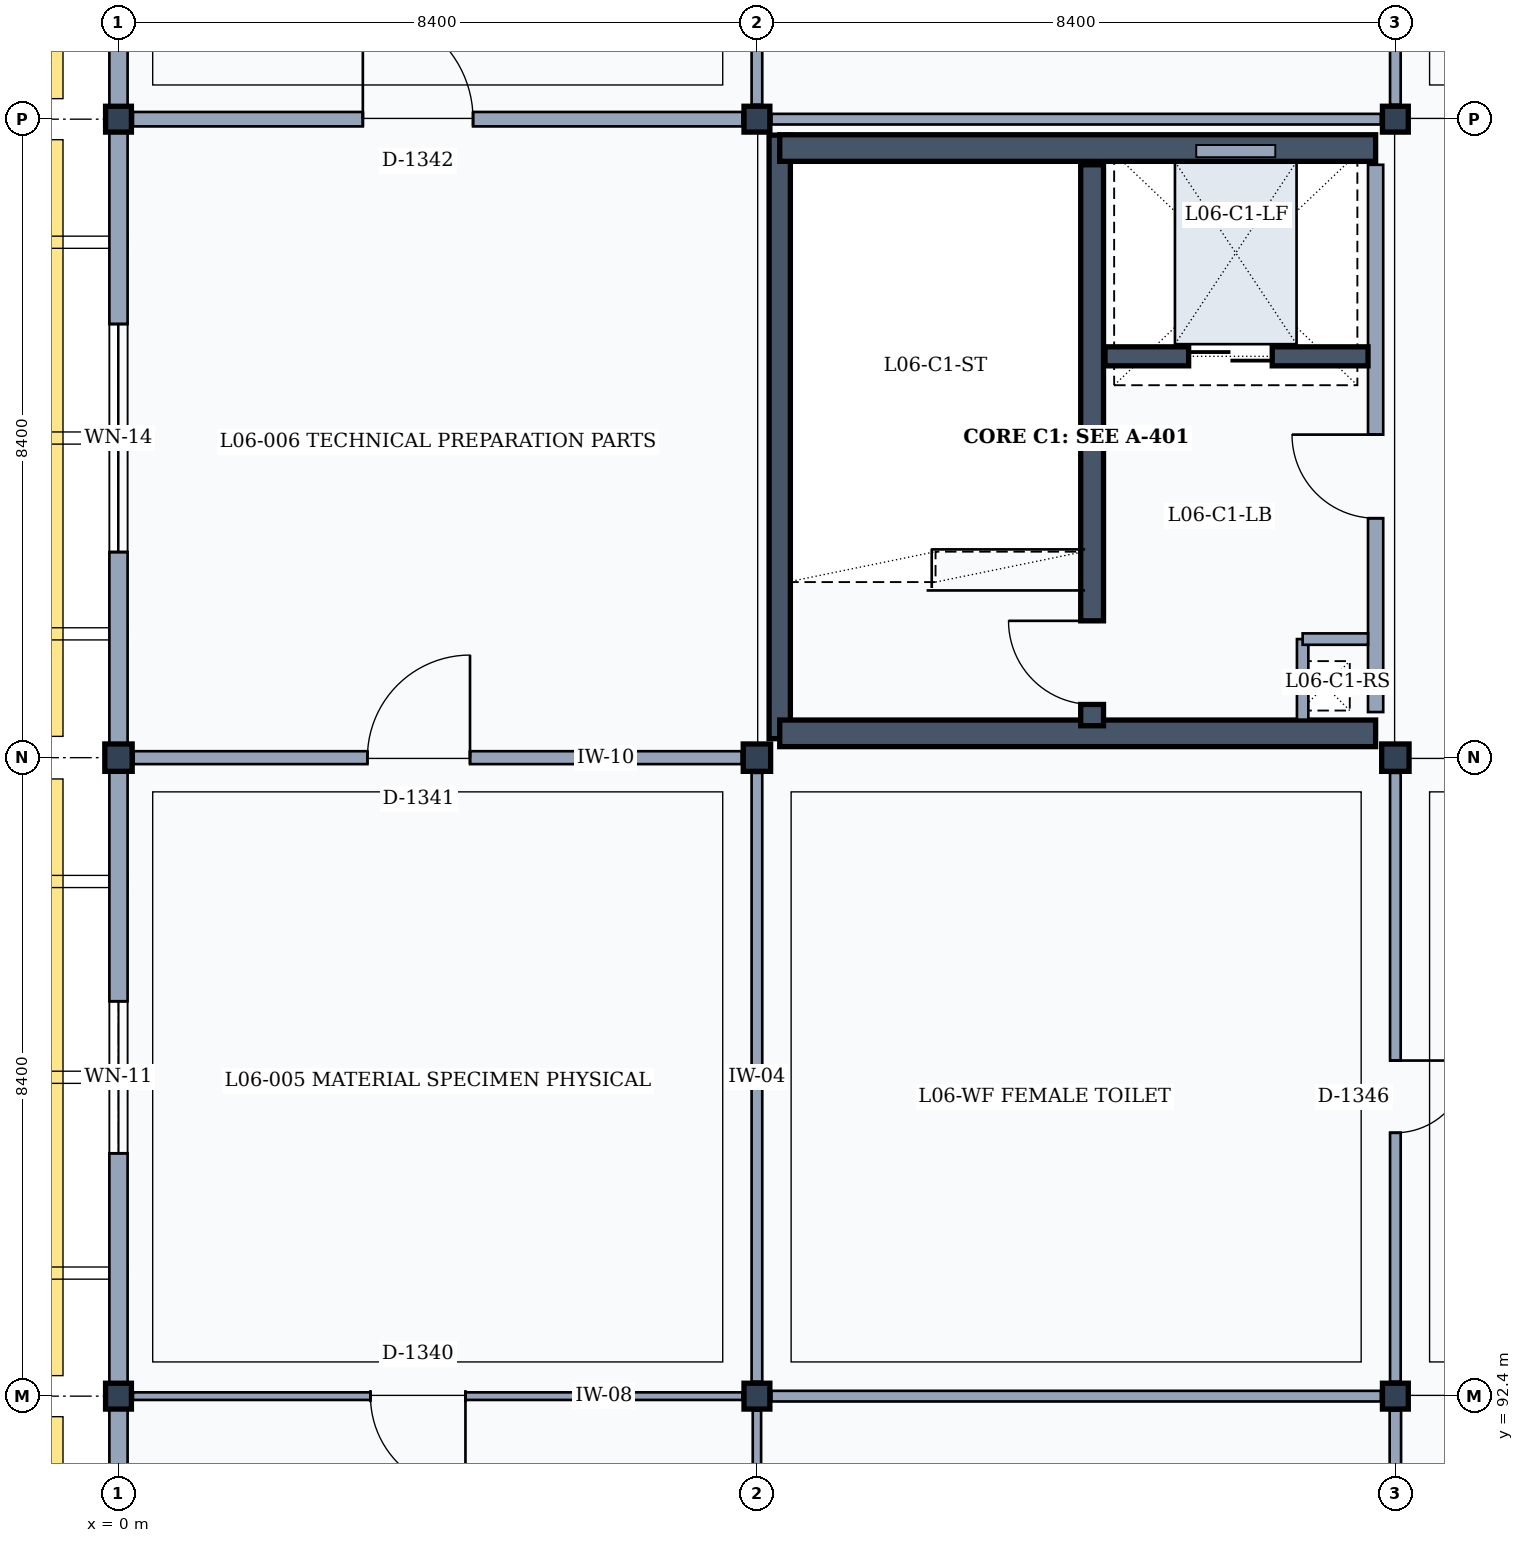
"""IFC4 building model, lengths in metres.
Left out: names, types, materials, properties, quantities, classifications, styles, units other than length and angle.
Written with IfcOpenShell. Run it as: python <this file> out.ifc"""

import sys

from ifc_helpers import new_model, si_unit, direction, frame, frame_2d, origin, origin_2d, place, context, subcontext, project, spatial, rectangle, extrude, element, fill, save


model = new_model("IFC4")
c1 = context("Model", 3, precision=1e-05, world=origin(), true_north=direction((0.0, 1.0)))
c2 = subcontext(c1, "Body", "Model", "MODEL_VIEW")
j1 = project(units=[si_unit("LENGTHUNIT", "METRE"), si_unit("PLANEANGLEUNIT", "RADIAN")], contexts=[c1])
p1 = place(None, origin())
s1 = spatial("IfcSite", under=j1, at=p1, CompositionType="ELEMENT")
p2 = place(p1, origin())
s2 = spatial("IfcBuilding", under=s1, at=p2, CompositionType="ELEMENT")
p3 = place(p2, frame((0.0, 0.0, 26.4)))
s3 = spatial("IfcBuildingStorey", under=s2, at=p3, CompositionType="ELEMENT", Elevation=26.4)
p4 = place(p3, frame((0.0, 92.4, 0.0), z_axis=(0.0, 0.0, 1.0), x_axis=(1.0, 0.0, 0.0)))
e1 = element("IfcColumn", 1, at=p4, inside=s3, PredefinedType="COLUMN", context=c2, shape_type="SweptSolid", body=[
    extrude(rectangle(XDim=0.34, YDim=0.34, at=origin_2d()), origin(), (0.0, 0.0, 1.0), 4.2),
])
p5 = place(p3, frame((0.0, 100.8, 0.0), z_axis=(0.0, 0.0, 1.0), x_axis=(1.0, 0.0, 0.0)))
e2 = element("IfcColumn", 2, at=p5, inside=s3, PredefinedType="COLUMN", context=c2, shape_type="SweptSolid", body=[
    extrude(rectangle(XDim=0.36, YDim=0.36, at=origin_2d()), origin(), (0.0, 0.0, 1.0), 4.2),
])
for number, where, z_axis, x_axis in (
    (3, (0.0, 109.2, 0.0), (0.0, 0.0, 1.0), (1.0, 0.0, 0.0)),
    (4, (8.4, 92.4, 0.0), (0.0, 0.0, 1.0), (1.0, 0.0, 0.0)),
):
    element("IfcColumn", number, at=place(p3, frame(where, z_axis=z_axis, x_axis=x_axis)), inside=s3, PredefinedType="COLUMN", context=c2, shape_type="SweptSolid", body=[
        extrude(rectangle(XDim=0.34, YDim=0.34, at=origin_2d()), origin(), (0.0, 0.0, 1.0), 4.2),
    ])
p6 = place(p3, frame((8.4, 100.8, 0.0), z_axis=(0.0, 0.0, 1.0), x_axis=(1.0, 0.0, 0.0)))
e5 = element("IfcColumn", 5, at=p6, inside=s3, PredefinedType="COLUMN", context=c2, shape_type="SweptSolid", body=[
    extrude(rectangle(XDim=0.36, YDim=0.36, at=origin_2d()), origin(), (0.0, 0.0, 1.0), 4.2),
])
for number, where, z_axis, x_axis in (
    (6, (8.4, 109.2, 0.0), (0.0, 0.0, 1.0), (1.0, 0.0, 0.0)),
    (7, (16.8, 92.4, 0.0), (0.0, 0.0, 1.0), (1.0, 0.0, 0.0)),
):
    element("IfcColumn", number, at=place(p3, frame(where, z_axis=z_axis, x_axis=x_axis)), inside=s3, PredefinedType="COLUMN", context=c2, shape_type="SweptSolid", body=[
        extrude(rectangle(XDim=0.34, YDim=0.34, at=origin_2d()), origin(), (0.0, 0.0, 1.0), 4.2),
    ])
p7 = place(p3, frame((16.8, 100.8, 0.0), z_axis=(0.0, 0.0, 1.0), x_axis=(1.0, 0.0, 0.0)))
e8 = element("IfcColumn", 8, at=p7, inside=s3, PredefinedType="COLUMN", context=c2, shape_type="SweptSolid", body=[
    extrude(rectangle(XDim=0.36, YDim=0.36, at=origin_2d()), origin(), (0.0, 0.0, 1.0), 4.2),
])
p8 = place(p3, frame((16.8, 109.2, 0.0), z_axis=(0.0, 0.0, 1.0), x_axis=(1.0, 0.0, 0.0)))
e9 = element("IfcColumn", 9, at=p8, inside=s3, PredefinedType="COLUMN", context=c2, shape_type="SweptSolid", body=[
    extrude(rectangle(XDim=0.34, YDim=0.34, at=origin_2d()), origin(), (0.0, 0.0, 1.0), 4.2),
])
p9 = place(p3, frame((0.0, 84.18, 0.0), z_axis=(0.0, 0.0, 1.0), x_axis=(0.0, 1.0, 0.0)))
e10 = element("IfcWall", 10, at=p9, inside=s3, PredefinedType="SOLIDWALL", context=c2, shape_type="SweptSolid", body=[
    extrude(rectangle(XDim=8.05, YDim=0.24, at=frame_2d((4.025, 0.0))), origin(), (0.0, 0.0, 1.0), 3.36),
])
p10 = place(p9, frame((3.225, 0.0, 0.9)))
e11 = element("IfcOpeningElement", 11, at=p10, cuts=e10, PredefinedType="OPENING", context=c2, shape_type="SweptSolid", body=[
    extrude(rectangle(XDim=1.6, YDim=2.0, at=frame_2d((0.8, 1.0))), frame((0.0, 0.13, 0.0), z_axis=(0.0, -1.0, 0.0), x_axis=(1.0, 0.0, 0.0)), (0.0, 0.0, 1.0), 0.26),
])
p11 = place(p3, frame((0.0, 92.57, 0.0), z_axis=(0.0, 0.0, 1.0), x_axis=(0.0, 1.0, 0.0)))
e12 = element("IfcWall", 12, at=p11, inside=s3, PredefinedType="SOLIDWALL", context=c2, shape_type="SweptSolid", body=[
    extrude(rectangle(XDim=8.05, YDim=0.24, at=frame_2d((4.025, 0.0))), origin(), (0.0, 0.0, 1.0), 3.36),
])
p12 = place(p11, frame((3.025, 0.0, 0.9)))
e13 = element("IfcOpeningElement", 13, at=p12, cuts=e12, PredefinedType="OPENING", context=c2, shape_type="SweptSolid", body=[
    extrude(rectangle(XDim=2.0, YDim=1.7, at=frame_2d((1.0, 0.85))), frame((0.0, 0.13, 0.0), z_axis=(0.0, -1.0, 0.0), x_axis=(1.0, 0.0, 0.0)), (0.0, 0.0, 1.0), 0.26),
])
p13 = place(p3, frame((0.0, 100.98, 0.0), z_axis=(0.0, 0.0, 1.0), x_axis=(0.0, 1.0, 0.0)))
e14 = element("IfcWall", 14, at=p13, inside=s3, PredefinedType="SOLIDWALL", context=c2, shape_type="SweptSolid", body=[
    extrude(rectangle(XDim=8.05, YDim=0.24, at=frame_2d((4.025, 0.0))), origin(), (0.0, 0.0, 1.0), 3.36),
])
p14 = place(p13, frame((2.525, 0.0, 0.9)))
e15 = element("IfcOpeningElement", 15, at=p14, cuts=e14, PredefinedType="OPENING", context=c2, shape_type="SweptSolid", body=[
    extrude(rectangle(XDim=3.0, YDim=1.8, at=frame_2d((1.5, 0.9))), frame((0.0, 0.13, 0.0), z_axis=(0.0, -1.0, 0.0), x_axis=(1.0, 0.0, 0.0)), (0.0, 0.0, 1.0), 0.26),
])
p15 = place(p3, frame((0.0, 109.37, 0.0), z_axis=(0.0, 0.0, 1.0), x_axis=(0.0, 1.0, 0.0)))
e16 = element("IfcWall", 16, at=p15, inside=s3, PredefinedType="SOLIDWALL", context=c2, shape_type="SweptSolid", body=[
    extrude(rectangle(XDim=8.05, YDim=0.24, at=frame_2d((4.025, 0.0))), origin(), (0.0, 0.0, 1.0), 3.36),
])
p16 = place(p15, frame((2.775, 0.0, 0.9)))
e17 = element("IfcOpeningElement", 17, at=p16, cuts=e16, PredefinedType="OPENING", context=c2, shape_type="SweptSolid", body=[
    extrude(rectangle(XDim=2.5, YDim=2.0, at=frame_2d((1.25, 1.0))), frame((0.0, 0.13, 0.0), z_axis=(0.0, -1.0, 0.0), x_axis=(1.0, 0.0, 0.0)), (0.0, 0.0, 1.0), 0.26),
])
p17 = place(p3, frame((8.7, 101.05, 0.0), z_axis=(0.0, 0.0, 1.0), x_axis=(0.0, 1.0, 0.0)))
e18 = element("IfcWall", 18, at=p17, inside=s3, PredefinedType="SHEAR", context=c2, shape_type="SweptSolid", body=[
    extrude(rectangle(XDim=7.94, YDim=0.28, at=frame_2d((3.97, 0.0))), origin(), (0.0, 0.0, 1.0), 3.99),
])
p18 = place(p3, frame((8.7, 108.82, 0.0), z_axis=(0.0, 0.0, 1.0), x_axis=(1.0, 0.0, 0.0)))
e19 = element("IfcWall", 19, at=p18, inside=s3, PredefinedType="SHEAR", context=c2, shape_type="SweptSolid", body=[
    extrude(rectangle(XDim=7.84, YDim=0.35, at=frame_2d((3.92, 0.0))), origin(), (0.0, 0.0, 1.0), 3.99),
])
p19 = place(p3, frame((16.54, 108.6, 0.0), z_axis=(0.0, 0.0, 1.0), x_axis=(0.0, -1.0, 0.0)))
e20 = element("IfcWall", 20, at=p19, inside=s3, PredefinedType="PARTITIONING", context=c2, shape_type="SweptSolid", body=[
    extrude(rectangle(XDim=7.2, YDim=0.2, at=frame_2d((3.6, 0.0))), origin(), (0.0, 0.0, 1.0), 3.32),
])
p20 = place(p19, frame((3.55, 0.0, 0.0)))
e21 = element("IfcOpeningElement", 21, at=p20, cuts=e20, PredefinedType="OPENING", context=c2, shape_type="SweptSolid", body=[
    extrude(rectangle(XDim=1.1, YDim=2.15, at=frame_2d((0.55, 1.075))), frame((0.0, 0.11, 0.0), z_axis=(0.0, -1.0, 0.0), x_axis=(1.0, 0.0, 0.0)), (0.0, 0.0, 1.0), 0.22),
])
p21 = place(p3, frame((16.54, 101.12, 0.0), z_axis=(0.0, 0.0, 1.0), x_axis=(-1.0, 0.0, 0.0)))
e22 = element("IfcWall", 22, at=p21, inside=s3, PredefinedType="SHEAR", context=c2, shape_type="SweptSolid", body=[
    extrude(rectangle(XDim=7.84, YDim=0.35, at=frame_2d((3.92, 0.0))), origin(), (0.0, 0.0, 1.0), 3.99),
])
p22 = place(p3, frame((12.81, 101.22, 0.0), z_axis=(0.0, 0.0, 1.0), x_axis=(0.0, 1.0, 0.0)))
e23 = element("IfcWall", 23, at=p22, inside=s3, PredefinedType="SHEAR", context=c2, shape_type="SweptSolid", body=[
    extrude(rectangle(XDim=7.38, YDim=0.3, at=frame_2d((3.69, 0.0))), origin(), (0.0, 0.0, 1.0), 3.99),
])
p23 = place(p22, frame((0.28, 0.0, 0.0)))
e24 = element("IfcOpeningElement", 24, at=p23, cuts=e23, PredefinedType="OPENING", context=c2, shape_type="SweptSolid", body=[
    extrude(rectangle(XDim=1.1, YDim=2.15, at=frame_2d((0.55, 1.075))), frame((0.0, 0.16, 0.0), z_axis=(0.0, -1.0, 0.0), x_axis=(1.0, 0.0, 0.0)), (0.0, 0.0, 1.0), 0.32),
])
p24 = place(p3, frame((15.58, 102.36, 0.0), z_axis=(0.0, 0.0, 1.0), x_axis=(0.0, -1.0, 0.0)))
e25 = element("IfcWall", 25, at=p24, inside=s3, PredefinedType="PARTITIONING", context=c2, shape_type="SweptSolid", body=[
    extrude(rectangle(XDim=1.06, YDim=0.15, at=frame_2d((0.53, 0.0))), origin(), (0.0, 0.0, 1.0), 3.32),
])
p25 = place(p3, frame((15.58, 102.36, 0.0), z_axis=(0.0, 0.0, 1.0), x_axis=(1.0, 0.0, 0.0)))
e26 = element("IfcWall", 26, at=p25, inside=s3, PredefinedType="PARTITIONING", context=c2, shape_type="SweptSolid", body=[
    extrude(rectangle(XDim=0.86, YDim=0.15, at=frame_2d((0.43, 0.0))), origin(), (0.0, 0.0, 1.0), 3.32),
])
p26 = place(p3, frame((12.98, 106.08, 0.0), z_axis=(0.0, 0.0, 1.0), x_axis=(1.0, 0.0, 0.0)))
e27 = element("IfcWall", 27, at=p26, inside=s3, PredefinedType="SHEAR", context=c2, shape_type="SweptSolid", body=[
    extrude(rectangle(XDim=3.46, YDim=0.25, at=frame_2d((1.73, 0.0))), origin(), (0.0, 0.0, 1.0), 3.99),
])
p27 = place(p26, frame((1.1, 0.0, 0.0)))
e28 = element("IfcOpeningElement", 28, at=p27, cuts=e27, PredefinedType="OPENING", context=c2, shape_type="SweptSolid", body=[
    extrude(rectangle(XDim=1.1, YDim=2.15, at=frame_2d((0.55, 1.075))), frame((0.0, 0.135, 0.0), z_axis=(0.0, -1.0, 0.0), x_axis=(1.0, 0.0, 0.0)), (0.0, 0.0, 1.0), 0.27),
])
p28 = place(p3, frame((8.4, 84.2, 0.0), z_axis=(0.0, 0.0, 1.0), x_axis=(0.0, 1.0, 0.0)))
e29 = element("IfcWall", 29, at=p28, inside=s3, PredefinedType="PARTITIONING", context=c2, shape_type="SweptSolid", body=[
    extrude(rectangle(XDim=8.01, YDim=0.11, at=frame_2d((4.005, 0.0))), origin(), (0.0, 0.0, 1.0), 3.32),
])
p29 = place(p28, frame((3.3, 0.0, 0.0)))
e30 = element("IfcOpeningElement", 30, at=p29, cuts=e29, PredefinedType="OPENING", context=c2, shape_type="SweptSolid", body=[
    extrude(rectangle(XDim=0.9, YDim=2.1, at=frame_2d((0.45, 1.05))), frame((0.0, 0.065, 0.0), z_axis=(0.0, -1.0, 0.0), x_axis=(1.0, 0.0, 0.0)), (0.0, 0.0, 1.0), 0.13),
])
p30 = place(p3, frame((0.19, 92.4, 0.0), z_axis=(0.0, 0.0, 1.0), x_axis=(1.0, 0.0, 0.0)))
e31 = element("IfcWall", 31, at=p30, inside=s3, PredefinedType="MOVABLE", context=c2, shape_type="SweptSolid", body=[
    extrude(rectangle(XDim=8.02, YDim=0.1, at=frame_2d((4.01, 0.0))), origin(), (0.0, 0.0, 1.0), 3.32),
])
p31 = place(p30, frame((3.125, 0.0, 0.0)))
e32 = element("IfcOpeningElement", 32, at=p31, cuts=e31, PredefinedType="OPENING", context=c2, shape_type="SweptSolid", body=[
    extrude(rectangle(XDim=1.25, YDim=2.3, at=frame_2d((0.625, 1.15))), frame((0.0, 0.06, 0.0), z_axis=(0.0, -1.0, 0.0), x_axis=(1.0, 0.0, 0.0)), (0.0, 0.0, 1.0), 0.12),
])
p32 = place(p3, frame((8.4, 92.59, 0.0), z_axis=(0.0, 0.0, 1.0), x_axis=(0.0, 1.0, 0.0)))
e33 = element("IfcWall", 33, at=p32, inside=s3, PredefinedType="PARTITIONING", context=c2, shape_type="SweptSolid", body=[
    extrude(rectangle(XDim=8.01, YDim=0.14, at=frame_2d((4.005, 0.0))), origin(), (0.0, 0.0, 1.0), 3.32),
])
p33 = place(p3, frame((0.2, 100.8, 0.0), z_axis=(0.0, 0.0, 1.0), x_axis=(1.0, 0.0, 0.0)))
e34 = element("IfcWall", 34, at=p33, inside=s3, PredefinedType="PARTITIONING", context=c2, shape_type="SweptSolid", body=[
    extrude(rectangle(XDim=8.0, YDim=0.17, at=frame_2d((4.0, 0.0))), origin(), (0.0, 0.0, 1.0), 3.32),
])
p34 = place(p33, frame((3.075, 0.0, 0.0)))
e35 = element("IfcOpeningElement", 35, at=p34, cuts=e34, PredefinedType="OPENING", context=c2, shape_type="SweptSolid", body=[
    extrude(rectangle(XDim=1.35, YDim=2.25, at=frame_2d((0.675, 1.125))), frame((0.0, 0.095, 0.0), z_axis=(0.0, -1.0, 0.0), x_axis=(1.0, 0.0, 0.0)), (0.0, 0.0, 1.0), 0.19),
])
p35 = place(p3, frame((0.19, 109.2, 0.0), z_axis=(0.0, 0.0, 1.0), x_axis=(1.0, 0.0, 0.0)))
e36 = element("IfcWall", 36, at=p35, inside=s3, PredefinedType="PARTITIONING", context=c2, shape_type="SweptSolid", body=[
    extrude(rectangle(XDim=8.02, YDim=0.19, at=frame_2d((4.01, 0.0))), origin(), (0.0, 0.0, 1.0), 3.32),
])
p36 = place(p35, frame((3.025, 0.0, 0.0)))
e37 = element("IfcOpeningElement", 37, at=p36, cuts=e36, PredefinedType="OPENING", context=c2, shape_type="SweptSolid", body=[
    extrude(rectangle(XDim=1.45, YDim=2.35, at=frame_2d((0.725, 1.175))), frame((0.0, 0.105, 0.0), z_axis=(0.0, -1.0, 0.0), x_axis=(1.0, 0.0, 0.0)), (0.0, 0.0, 1.0), 0.21),
])
p37 = place(p3, frame((8.4, 109.39, 0.0), z_axis=(0.0, 0.0, 1.0), x_axis=(0.0, 1.0, 0.0)))
e38 = element("IfcWall", 38, at=p37, inside=s3, PredefinedType="PARTITIONING", context=c2, shape_type="SweptSolid", body=[
    extrude(rectangle(XDim=8.01, YDim=0.14, at=frame_2d((4.005, 0.0))), origin(), (0.0, 0.0, 1.0), 3.32),
])
p38 = place(p3, frame((16.8, 84.2, 0.0), z_axis=(0.0, 0.0, 1.0), x_axis=(0.0, 1.0, 0.0)))
e39 = element("IfcWall", 39, at=p38, inside=s3, PredefinedType="PARTITIONING", context=c2, shape_type="SweptSolid", body=[
    extrude(rectangle(XDim=8.01, YDim=0.15, at=frame_2d((4.005, 0.0))), origin(), (0.0, 0.0, 1.0), 3.32),
])
p39 = place(p38, frame((2.85, 0.0, 0.0)))
e40 = element("IfcOpeningElement", 40, at=p39, cuts=e39, PredefinedType="OPENING", context=c2, shape_type="SweptSolid", body=[
    extrude(rectangle(XDim=1.8, YDim=2.3, at=frame_2d((0.9, 1.15))), frame((0.0, 0.085, 0.0), z_axis=(0.0, -1.0, 0.0), x_axis=(1.0, 0.0, 0.0)), (0.0, 0.0, 1.0), 0.17),
])
p40 = place(p3, frame((8.59, 92.4, 0.0), z_axis=(0.0, 0.0, 1.0), x_axis=(1.0, 0.0, 0.0)))
e41 = element("IfcWall", 41, at=p40, inside=s3, PredefinedType="PARTITIONING", context=c2, shape_type="SweptSolid", body=[
    extrude(rectangle(XDim=8.02, YDim=0.14, at=frame_2d((4.01, 0.0))), origin(), (0.0, 0.0, 1.0), 3.32),
])
p41 = place(p3, frame((16.8, 92.59, 0.0), z_axis=(0.0, 0.0, 1.0), x_axis=(0.0, 1.0, 0.0)))
e42 = element("IfcWall", 42, at=p41, inside=s3, PredefinedType="PARTITIONING", context=c2, shape_type="SweptSolid", body=[
    extrude(rectangle(XDim=8.01, YDim=0.14, at=frame_2d((4.005, 0.0))), origin(), (0.0, 0.0, 1.0), 3.32),
])
p42 = place(p41, frame((3.275, 0.0, 0.0)))
e43 = element("IfcOpeningElement", 43, at=p42, cuts=e42, PredefinedType="OPENING", context=c2, shape_type="SweptSolid", body=[
    extrude(rectangle(XDim=0.95, YDim=2.15, at=frame_2d((0.475, 1.075))), frame((0.0, 0.08, 0.0), z_axis=(0.0, -1.0, 0.0), x_axis=(1.0, 0.0, 0.0)), (0.0, 0.0, 1.0), 0.16),
])
p43 = place(p3, frame((8.59, 109.2, 0.0), z_axis=(0.0, 0.0, 1.0), x_axis=(1.0, 0.0, 0.0)))
e44 = element("IfcWall", 44, at=p43, inside=s3, PredefinedType="PARTITIONING", context=c2, shape_type="SweptSolid", body=[
    extrude(rectangle(XDim=8.02, YDim=0.14, at=frame_2d((4.01, 0.0))), origin(), (0.0, 0.0, 1.0), 3.32),
])
p44 = place(p3, frame((16.8, 109.39, 0.0), z_axis=(0.0, 0.0, 1.0), x_axis=(0.0, 1.0, 0.0)))
e45 = element("IfcWall", 45, at=p44, inside=s3, PredefinedType="PARTITIONING", context=c2, shape_type="SweptSolid", body=[
    extrude(rectangle(XDim=8.01, YDim=0.14, at=frame_2d((4.005, 0.0))), origin(), (0.0, 0.0, 1.0), 3.32),
])
p45 = place(p44, frame((3.275, 0.0, 0.0)))
e46 = element("IfcOpeningElement", 46, at=p45, cuts=e45, PredefinedType="OPENING", context=c2, shape_type="SweptSolid", body=[
    extrude(rectangle(XDim=0.95, YDim=2.15, at=frame_2d((0.475, 1.075))), frame((0.0, 0.08, 0.0), z_axis=(0.0, -1.0, 0.0), x_axis=(1.0, 0.0, 0.0)), (0.0, 0.0, 1.0), 0.16),
])
p46 = place(p12, origin())
e47 = element("IfcWindow", 47, at=p46, inside=s3, PartitioningType="SINGLE_PANEL", PredefinedType="WINDOW", context=c2, shape_type="SweptSolid", body=[
    extrude(rectangle(XDim=2.0, YDim=1.7, at=frame_2d((1.0, 0.85))), frame((0.0, 0.03, 0.0), z_axis=(0.0, -1.0, 0.0), x_axis=(1.0, 0.0, 0.0)), (0.0, 0.0, 1.0), 0.06),
])
fill(e13, e47)
p47 = place(p14, origin())
e48 = element("IfcWindow", 48, at=p47, inside=s3, PartitioningType="SINGLE_PANEL", PredefinedType="WINDOW", context=c2, shape_type="SweptSolid", body=[
    extrude(rectangle(XDim=3.0, YDim=1.8, at=frame_2d((1.5, 0.9))), frame((0.0, 0.03, 0.0), z_axis=(0.0, -1.0, 0.0), x_axis=(1.0, 0.0, 0.0)), (0.0, 0.0, 1.0), 0.06),
])
fill(e15, e48)
p48 = place(p20, frame((1.1, 0.0, 0.0), z_axis=(0.0, 0.0, 1.0), x_axis=(-1.0, 0.0, 0.0)))
e49 = element("IfcDoor", 49, at=p48, inside=s3, OperationType="SINGLE_SWING_RIGHT", PredefinedType="DOOR", context=c2, shape_type="SweptSolid", body=[
    extrude(rectangle(XDim=1.1, YDim=2.15, at=frame_2d((0.55, 1.075))), frame((0.0, 0.025, 0.0), z_axis=(0.0, -1.0, 0.0), x_axis=(1.0, 0.0, 0.0)), (0.0, 0.0, 1.0), 0.05),
])
fill(e21, e49)
p49 = place(p23, origin())
e50 = element("IfcDoor", 50, at=p49, inside=s3, OperationType="SINGLE_SWING_RIGHT", PredefinedType="DOOR", context=c2, shape_type="SweptSolid", body=[
    extrude(rectangle(XDim=1.1, YDim=2.15, at=frame_2d((0.55, 1.075))), frame((0.0, 0.025, 0.0), z_axis=(0.0, -1.0, 0.0), x_axis=(1.0, 0.0, 0.0)), (0.0, 0.0, 1.0), 0.05),
])
fill(e24, e50)
p50 = place(p27, origin())
e51 = element("IfcDoor", 51, at=p50, inside=s3, OperationType="DOUBLE_DOOR_SLIDING", PredefinedType="DOOR", context=c2, shape_type="SweptSolid", body=[
    extrude(rectangle(XDim=1.1, YDim=2.15, at=frame_2d((0.55, 1.075))), frame((0.0, 0.025, 0.0), z_axis=(0.0, -1.0, 0.0), x_axis=(1.0, 0.0, 0.0)), (0.0, 0.0, 1.0), 0.05),
])
fill(e28, e51)
p51 = place(p31, frame((1.25, 0.0, 0.0), z_axis=(0.0, 0.0, 1.0), x_axis=(-1.0, 0.0, 0.0)))
e52 = element("IfcDoor", 52, at=p51, inside=s3, OperationType="SINGLE_SWING_LEFT", PredefinedType="DOOR", context=c2, shape_type="SweptSolid", body=[
    extrude(rectangle(XDim=1.25, YDim=2.3, at=frame_2d((0.625, 1.15))), frame((0.0, 0.025, 0.0), z_axis=(0.0, -1.0, 0.0), x_axis=(1.0, 0.0, 0.0)), (0.0, 0.0, 1.0), 0.05),
])
fill(e32, e52)
p52 = place(p34, origin())
e53 = element("IfcDoor", 53, at=p52, inside=s3, OperationType="SINGLE_SWING_RIGHT", PredefinedType="DOOR", context=c2, shape_type="SweptSolid", body=[
    extrude(rectangle(XDim=1.35, YDim=2.25, at=frame_2d((0.675, 1.125))), frame((0.0, 0.025, 0.0), z_axis=(0.0, -1.0, 0.0), x_axis=(1.0, 0.0, 0.0)), (0.0, 0.0, 1.0), 0.05),
])
fill(e35, e53)
p53 = place(p36, origin())
e54 = element("IfcDoor", 54, at=p53, inside=s3, OperationType="SINGLE_SWING_LEFT", PredefinedType="DOOR", context=c2, shape_type="SweptSolid", body=[
    extrude(rectangle(XDim=1.45, YDim=2.35, at=frame_2d((0.725, 1.175))), frame((0.0, 0.025, 0.0), z_axis=(0.0, -1.0, 0.0), x_axis=(1.0, 0.0, 0.0)), (0.0, 0.0, 1.0), 0.05),
])
fill(e37, e54)
p54 = place(p42, frame((0.95, 0.0, 0.0), z_axis=(0.0, 0.0, 1.0), x_axis=(-1.0, 0.0, 0.0)))
e55 = element("IfcDoor", 55, at=p54, inside=s3, OperationType="SINGLE_SWING_LEFT", PredefinedType="DOOR", context=c2, shape_type="SweptSolid", body=[
    extrude(rectangle(XDim=0.95, YDim=2.15, at=frame_2d((0.475, 1.075))), frame((0.0, 0.025, 0.0), z_axis=(0.0, -1.0, 0.0), x_axis=(1.0, 0.0, 0.0)), (0.0, 0.0, 1.0), 0.05),
])
fill(e43, e55)
save(model, sys.argv[1])
